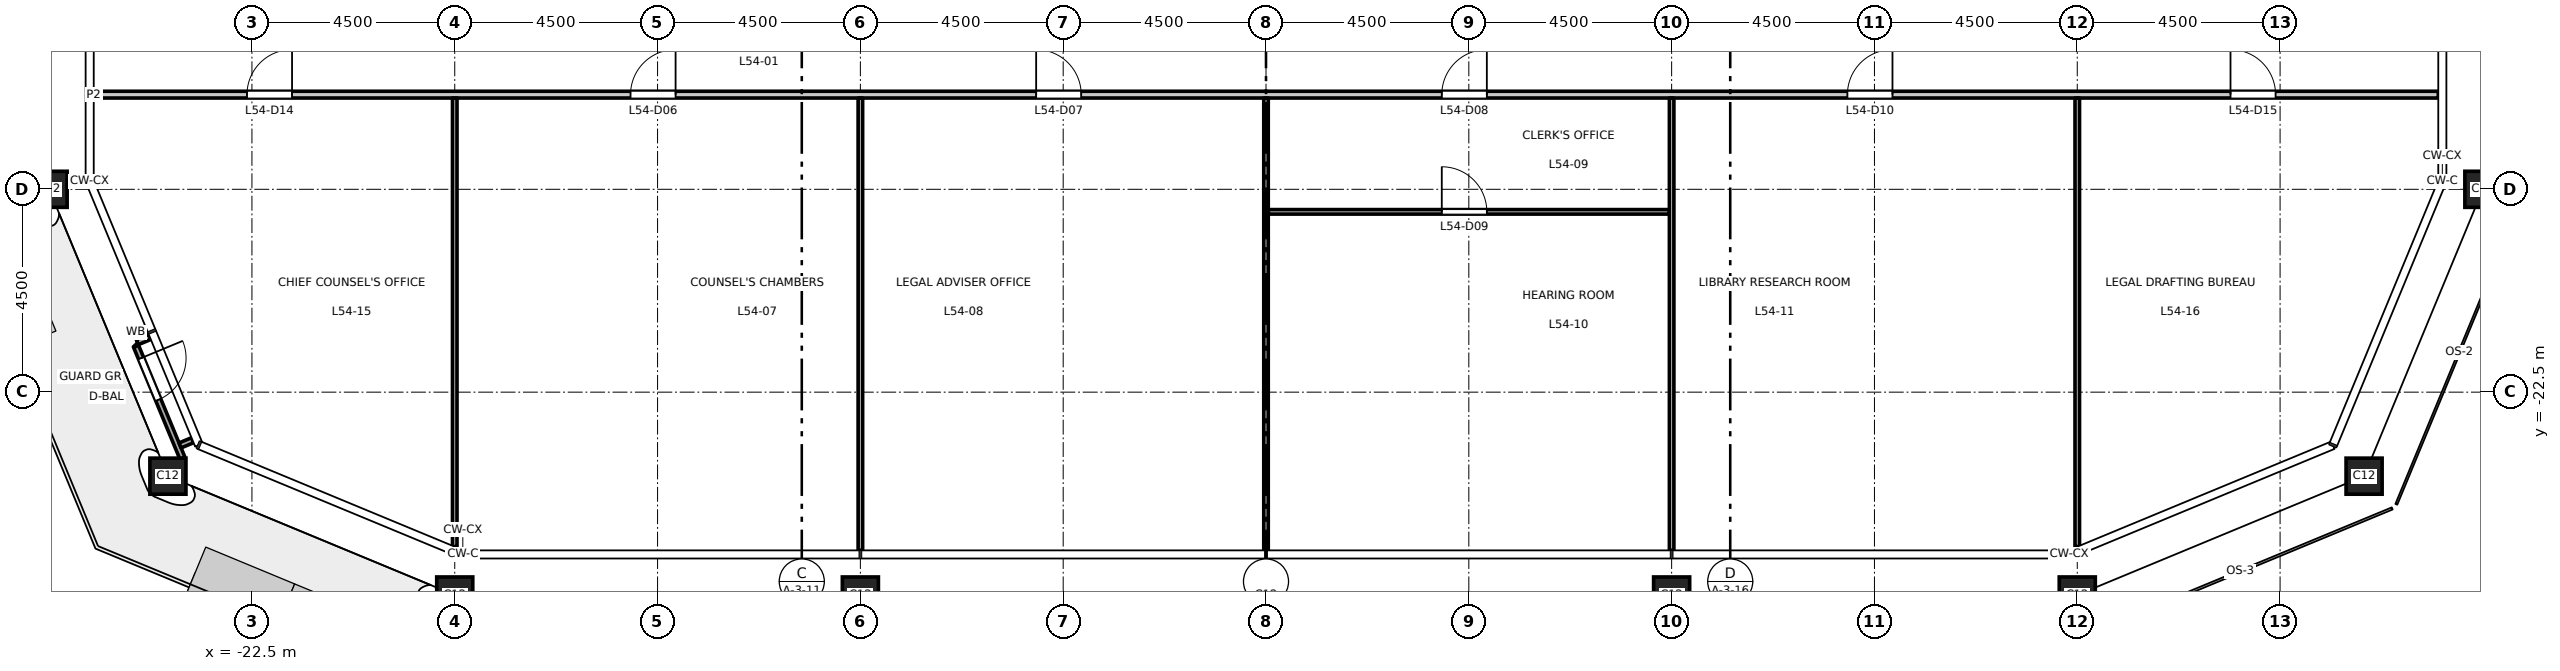
"""IFC4 building model, lengths in metres.
Left out: names, types, materials, properties, quantities, classifications, styles, units other than length and angle.
Written with IfcOpenShell. Run it as: python <this file> out.ifc"""

import sys

from ifc_helpers import new_model, si_unit, direction, frame, frame_2d, origin, origin_2d, place, context, subcontext, project, spatial, rectangle, hollow_rectangle, extrude, element, fill, save


model = new_model("IFC4")
c1 = context("Model", 3, precision=1e-05, world=origin(), true_north=direction((0.0, 1.0)))
c2 = subcontext(c1, "Body", "Model", "MODEL_VIEW")
j1 = project(units=[si_unit("LENGTHUNIT", "METRE"), si_unit("PLANEANGLEUNIT", "RADIAN")], contexts=[c1])
p1 = place(None, origin())
s1 = spatial("IfcSite", under=j1, at=p1, CompositionType="ELEMENT")
p2 = place(p1, origin())
s2 = spatial("IfcBuilding", under=s1, at=p2, CompositionType="ELEMENT")
p3 = place(p2, frame((0.0, 0.0, 251.2)))
s3 = spatial("IfcBuildingStorey", under=s2, at=p3, CompositionType="ELEMENT", Elevation=251.2)
for number, where, z_axis, x_axis in (
    (1, (-18.0, -27.0, 0.0), (0.0, 0.0, 1.0), (1.0, 0.0, 0.0)),
    (2, (-9.0, -27.0, 0.0), (0.0, 0.0, 1.0), (1.0, 0.0, 0.0)),
    (3, (0.0, -27.0, 0.0), (0.0, 0.0, 1.0), (1.0, 0.0, 0.0)),
    (4, (9.0, -27.0, 0.0), (0.0, 0.0, 1.0), (1.0, 0.0, 0.0)),
    (5, (18.0, -27.0, 0.0), (0.0, 0.0, 1.0), (1.0, 0.0, 0.0)),
    (6, (24.364, -24.364, 0.0), (0.0, 0.0, 1.0), (1.0, 0.0, 0.0)),
    (7, (27.0, -18.0, 0.0), (0.0, 0.0, 1.0), (1.0, 0.0, 0.0)),
    (8, (-27.0, -18.0, 0.0), (0.0, 0.0, 1.0), (1.0, 0.0, 0.0)),
    (9, (-24.364, -24.364, 0.0), (0.0, 0.0, 1.0), (1.0, 0.0, 0.0)),
):
    element("IfcColumn", number, at=place(p3, frame(where, z_axis=z_axis, x_axis=x_axis)), inside=s3, PredefinedType="COLUMN", context=c2, shape_type="SweptSolid", body=[
        extrude(hollow_rectangle(XDim=0.8, YDim=0.8, WallThickness=0.045, at=origin_2d()), origin(), (0.0, 0.0, 1.0), 4.5),
    ])
p4 = place(p3, frame((-24.766, -21.276, 0.0), z_axis=(0.0, 0.0, 1.0), x_axis=(-0.923917630863, -0.382591441855, 0.0)))
e10 = element("IfcWall", 10, at=p4, inside=s3, PredefinedType="STANDARD", context=c2, shape_type="SweptSolid", body=[
    extrude(rectangle(XDim=0.3, YDim=0.12, at=frame_2d((0.15, 0.0))), origin(), (0.0, 0.0, 1.0), 4.35),
])
p5 = place(p3, frame((-23.818, -23.566, 0.0), z_axis=(0.0, 0.0, 1.0), x_axis=(-0.923629715641, -0.383285987724, 0.0)))
e11 = element("IfcWall", 11, at=p5, inside=s3, PredefinedType="STANDARD", context=c2, shape_type="SweptSolid", body=[
    extrude(rectangle(XDim=0.3, YDim=0.12, at=frame_2d((0.15, 0.0))), origin(), (0.0, 0.0, 1.0), 4.35),
])
p6 = place(p3, frame((-25.076, -21.469, 0.0), z_axis=(0.0, 0.0, 1.0), x_axis=(0.382695131424, -0.923874686516, 0.0)))
e12 = element("IfcWall", 12, at=p6, inside=s3, PredefinedType="STANDARD", context=c2, shape_type="SweptSolid", body=[
    extrude(rectangle(XDim=2.7, YDim=0.12, at=frame_2d((1.35, 0.0))), origin(), (0.0, 0.0, 1.0), 4.35),
])
p7 = place(p6, frame((0.3, 0.0, 0.0)))
e13 = element("IfcOpeningElement", 13, at=p7, cuts=e12, PredefinedType="OPENING", context=c2, shape_type="SweptSolid", body=[
    extrude(rectangle(XDim=1.0, YDim=2.4, at=frame_2d((0.5, 1.2))), frame((0.0, 0.07, 0.0), z_axis=(0.0, -1.0, 0.0), x_axis=(1.0, 0.0, 0.0)), (0.0, 0.0, 1.0), 0.14),
])
p8 = place(p3, frame((0.05, -18.5, 0.0), z_axis=(0.0, 0.0, 1.0), x_axis=(1.0, 0.0, 0.0)))
e14 = element("IfcWall", 14, at=p8, inside=s3, PredefinedType="PARTITIONING", context=c2, shape_type="SweptSolid", body=[
    extrude(rectangle(XDim=8.9, YDim=0.1, at=frame_2d((4.45, 0.0))), origin(), (0.0, 0.0, 1.0), 4.35),
])
p9 = place(p8, frame((3.85, 0.0, 0.0)))
e15 = element("IfcOpeningElement", 15, at=p9, cuts=e14, PredefinedType="OPENING", context=c2, shape_type="SweptSolid", body=[
    extrude(rectangle(XDim=1.0, YDim=2.1, at=frame_2d((0.5, 1.05))), frame((0.0, 0.06, 0.0), z_axis=(0.0, -1.0, 0.0), x_axis=(1.0, 0.0, 0.0)), (0.0, 0.0, 1.0), 0.12),
])
p10 = place(p3, frame((-26.01, -15.9, 0.0), z_axis=(0.0, 0.0, 1.0), x_axis=(1.0, 0.0, 0.0)))
e16 = element("IfcWall", 16, at=p10, inside=s3, PredefinedType="PARTITIONING", context=c2, shape_type="SweptSolid", body=[
    extrude(rectangle(XDim=52.02, YDim=0.15, at=frame_2d((26.01, 0.0))), origin(), (0.0, 0.0, 1.0), 4.35),
])
p11 = place(p10, frame((11.91, 0.0, 0.0)))
e17 = element("IfcOpeningElement", 17, at=p11, cuts=e16, PredefinedType="OPENING", context=c2, shape_type="SweptSolid", body=[
    extrude(rectangle(XDim=1.0, YDim=2.1, at=frame_2d((0.5, 1.05))), frame((0.0, 0.085, 0.0), z_axis=(0.0, -1.0, 0.0), x_axis=(1.0, 0.0, 0.0)), (0.0, 0.0, 1.0), 0.17),
])
p12 = place(p10, frame((20.91, 0.0, 0.0)))
e18 = element("IfcOpeningElement", 18, at=p12, cuts=e16, PredefinedType="OPENING", context=c2, shape_type="SweptSolid", body=[
    extrude(rectangle(XDim=1.0, YDim=2.1, at=frame_2d((0.5, 1.05))), frame((0.0, 0.085, 0.0), z_axis=(0.0, -1.0, 0.0), x_axis=(1.0, 0.0, 0.0)), (0.0, 0.0, 1.0), 0.17),
])
p13 = place(p10, frame((29.91, 0.0, 0.0)))
e19 = element("IfcOpeningElement", 19, at=p13, cuts=e16, PredefinedType="OPENING", context=c2, shape_type="SweptSolid", body=[
    extrude(rectangle(XDim=1.0, YDim=2.1, at=frame_2d((0.5, 1.05))), frame((0.0, 0.085, 0.0), z_axis=(0.0, -1.0, 0.0), x_axis=(1.0, 0.0, 0.0)), (0.0, 0.0, 1.0), 0.17),
])
p14 = place(p10, frame((38.91, 0.0, 0.0)))
e20 = element("IfcOpeningElement", 20, at=p14, cuts=e16, PredefinedType="OPENING", context=c2, shape_type="SweptSolid", body=[
    extrude(rectangle(XDim=1.0, YDim=2.1, at=frame_2d((0.5, 1.05))), frame((0.0, 0.085, 0.0), z_axis=(0.0, -1.0, 0.0), x_axis=(1.0, 0.0, 0.0)), (0.0, 0.0, 1.0), 0.17),
])
p15 = place(p10, frame((3.4, 0.0, 0.0)))
e21 = element("IfcOpeningElement", 21, at=p15, cuts=e16, PredefinedType="OPENING", context=c2, shape_type="SweptSolid", body=[
    extrude(rectangle(XDim=1.0, YDim=2.1, at=frame_2d((0.5, 1.05))), frame((0.0, 0.085, 0.0), z_axis=(0.0, -1.0, 0.0), x_axis=(1.0, 0.0, 0.0)), (0.0, 0.0, 1.0), 0.17),
])
p16 = place(p10, frame((47.41, 0.0, 0.0)))
e22 = element("IfcOpeningElement", 22, at=p16, cuts=e16, PredefinedType="OPENING", context=c2, shape_type="SweptSolid", body=[
    extrude(rectangle(XDim=1.0, YDim=2.1, at=frame_2d((0.5, 1.05))), frame((0.0, 0.085, 0.0), z_axis=(0.0, -1.0, 0.0), x_axis=(1.0, 0.0, 0.0)), (0.0, 0.0, 1.0), 0.17),
])
p17 = place(p3, frame((-18.0, -25.928, 0.0), z_axis=(0.0, 0.0, 1.0), x_axis=(0.0, 1.0, 0.0)))
e23 = element("IfcWall", 23, at=p17, inside=s3, PredefinedType="PARTITIONING", context=c2, shape_type="SweptSolid", body=[
    extrude(rectangle(XDim=9.953, YDim=0.1, at=frame_2d((4.977, 0.0))), origin(), (0.0, 0.0, 1.0), 3.65),
])
p18 = place(p3, frame((-9.0, -26.01, 0.0), z_axis=(0.0, 0.0, 1.0), x_axis=(0.0, 1.0, 0.0)))
e24 = element("IfcWall", 24, at=p18, inside=s3, PredefinedType="PARTITIONING", context=c2, shape_type="SweptSolid", body=[
    extrude(rectangle(XDim=10.035, YDim=0.1, at=frame_2d((5.018, 0.0))), origin(), (0.0, 0.0, 1.0), 3.65),
])
p19 = place(p3, frame((0.0, -26.01, 0.0), z_axis=(0.0, 0.0, 1.0), x_axis=(0.0, 1.0, 0.0)))
e25 = element("IfcWall", 25, at=p19, inside=s3, PredefinedType="PARTITIONING", context=c2, shape_type="SweptSolid", body=[
    extrude(rectangle(XDim=10.035, YDim=0.1, at=frame_2d((5.018, 0.0))), origin(), (0.0, 0.0, 1.0), 3.55),
])
p20 = place(p3, frame((9.0, -26.01, 0.0), z_axis=(0.0, 0.0, 1.0), x_axis=(0.0, 1.0, 0.0)))
e26 = element("IfcWall", 26, at=p20, inside=s3, PredefinedType="PARTITIONING", context=c2, shape_type="SweptSolid", body=[
    extrude(rectangle(XDim=10.035, YDim=0.1, at=frame_2d((5.018, 0.0))), origin(), (0.0, 0.0, 1.0), 3.65),
])
p21 = place(p3, frame((18.0, -25.928, 0.0), z_axis=(0.0, 0.0, 1.0), x_axis=(0.0, 1.0, 0.0)))
e27 = element("IfcWall", 27, at=p21, inside=s3, PredefinedType="PARTITIONING", context=c2, shape_type="SweptSolid", body=[
    extrude(rectangle(XDim=9.953, YDim=0.1, at=frame_2d((4.977, 0.0))), origin(), (0.0, 0.0, 1.0), 3.65),
])
p22 = place(p7, origin())
e28 = element("IfcDoor", 28, at=p22, inside=s3, OperationType="SINGLE_SWING_LEFT", PredefinedType="DOOR", context=c2, shape_type="SweptSolid", body=[
    extrude(rectangle(XDim=1.0, YDim=2.4, at=frame_2d((0.5, 1.2))), frame((0.0, 0.025, 0.0), z_axis=(0.0, -1.0, 0.0), x_axis=(1.0, 0.0, 0.0)), (0.0, 0.0, 1.0), 0.05),
])
fill(e13, e28)
p23 = place(p11, origin())
e29 = element("IfcDoor", 29, at=p23, inside=s3, OperationType="SINGLE_SWING_RIGHT", PredefinedType="DOOR", context=c2, shape_type="SweptSolid", body=[
    extrude(rectangle(XDim=1.0, YDim=2.1, at=frame_2d((0.5, 1.05))), frame((0.0, 0.025, 0.0), z_axis=(0.0, -1.0, 0.0), x_axis=(1.0, 0.0, 0.0)), (0.0, 0.0, 1.0), 0.05),
])
fill(e17, e29)
p24 = place(p12, origin())
e30 = element("IfcDoor", 30, at=p24, inside=s3, OperationType="SINGLE_SWING_LEFT", PredefinedType="DOOR", context=c2, shape_type="SweptSolid", body=[
    extrude(rectangle(XDim=1.0, YDim=2.1, at=frame_2d((0.5, 1.05))), frame((0.0, 0.025, 0.0), z_axis=(0.0, -1.0, 0.0), x_axis=(1.0, 0.0, 0.0)), (0.0, 0.0, 1.0), 0.05),
])
fill(e18, e30)
p25 = place(p13, origin())
e31 = element("IfcDoor", 31, at=p25, inside=s3, OperationType="SINGLE_SWING_RIGHT", PredefinedType="DOOR", context=c2, shape_type="SweptSolid", body=[
    extrude(rectangle(XDim=1.0, YDim=2.1, at=frame_2d((0.5, 1.05))), frame((0.0, 0.025, 0.0), z_axis=(0.0, -1.0, 0.0), x_axis=(1.0, 0.0, 0.0)), (0.0, 0.0, 1.0), 0.05),
])
fill(e19, e31)
p26 = place(p9, origin())
e32 = element("IfcDoor", 32, at=p26, inside=s3, OperationType="SINGLE_SWING_LEFT", PredefinedType="DOOR", context=c2, shape_type="SweptSolid", body=[
    extrude(rectangle(XDim=1.0, YDim=2.1, at=frame_2d((0.5, 1.05))), frame((0.0, 0.025, 0.0), z_axis=(0.0, -1.0, 0.0), x_axis=(1.0, 0.0, 0.0)), (0.0, 0.0, 1.0), 0.05),
])
fill(e15, e32)
p27 = place(p14, origin())
e33 = element("IfcDoor", 33, at=p27, inside=s3, OperationType="SINGLE_SWING_RIGHT", PredefinedType="DOOR", context=c2, shape_type="SweptSolid", body=[
    extrude(rectangle(XDim=1.0, YDim=2.1, at=frame_2d((0.5, 1.05))), frame((0.0, 0.025, 0.0), z_axis=(0.0, -1.0, 0.0), x_axis=(1.0, 0.0, 0.0)), (0.0, 0.0, 1.0), 0.05),
])
fill(e20, e33)
p28 = place(p15, origin())
e34 = element("IfcDoor", 34, at=p28, inside=s3, OperationType="SINGLE_SWING_RIGHT", PredefinedType="DOOR", context=c2, shape_type="SweptSolid", body=[
    extrude(rectangle(XDim=1.0, YDim=2.1, at=frame_2d((0.5, 1.05))), frame((0.0, 0.025, 0.0), z_axis=(0.0, -1.0, 0.0), x_axis=(1.0, 0.0, 0.0)), (0.0, 0.0, 1.0), 0.05),
])
fill(e21, e34)
p29 = place(p16, origin())
e35 = element("IfcDoor", 35, at=p29, inside=s3, OperationType="SINGLE_SWING_LEFT", PredefinedType="DOOR", context=c2, shape_type="SweptSolid", body=[
    extrude(rectangle(XDim=1.0, YDim=2.1, at=frame_2d((0.5, 1.05))), frame((0.0, 0.025, 0.0), z_axis=(0.0, -1.0, 0.0), x_axis=(1.0, 0.0, 0.0)), (0.0, 0.0, 1.0), 0.05),
])
fill(e22, e35)
save(model, sys.argv[1])
